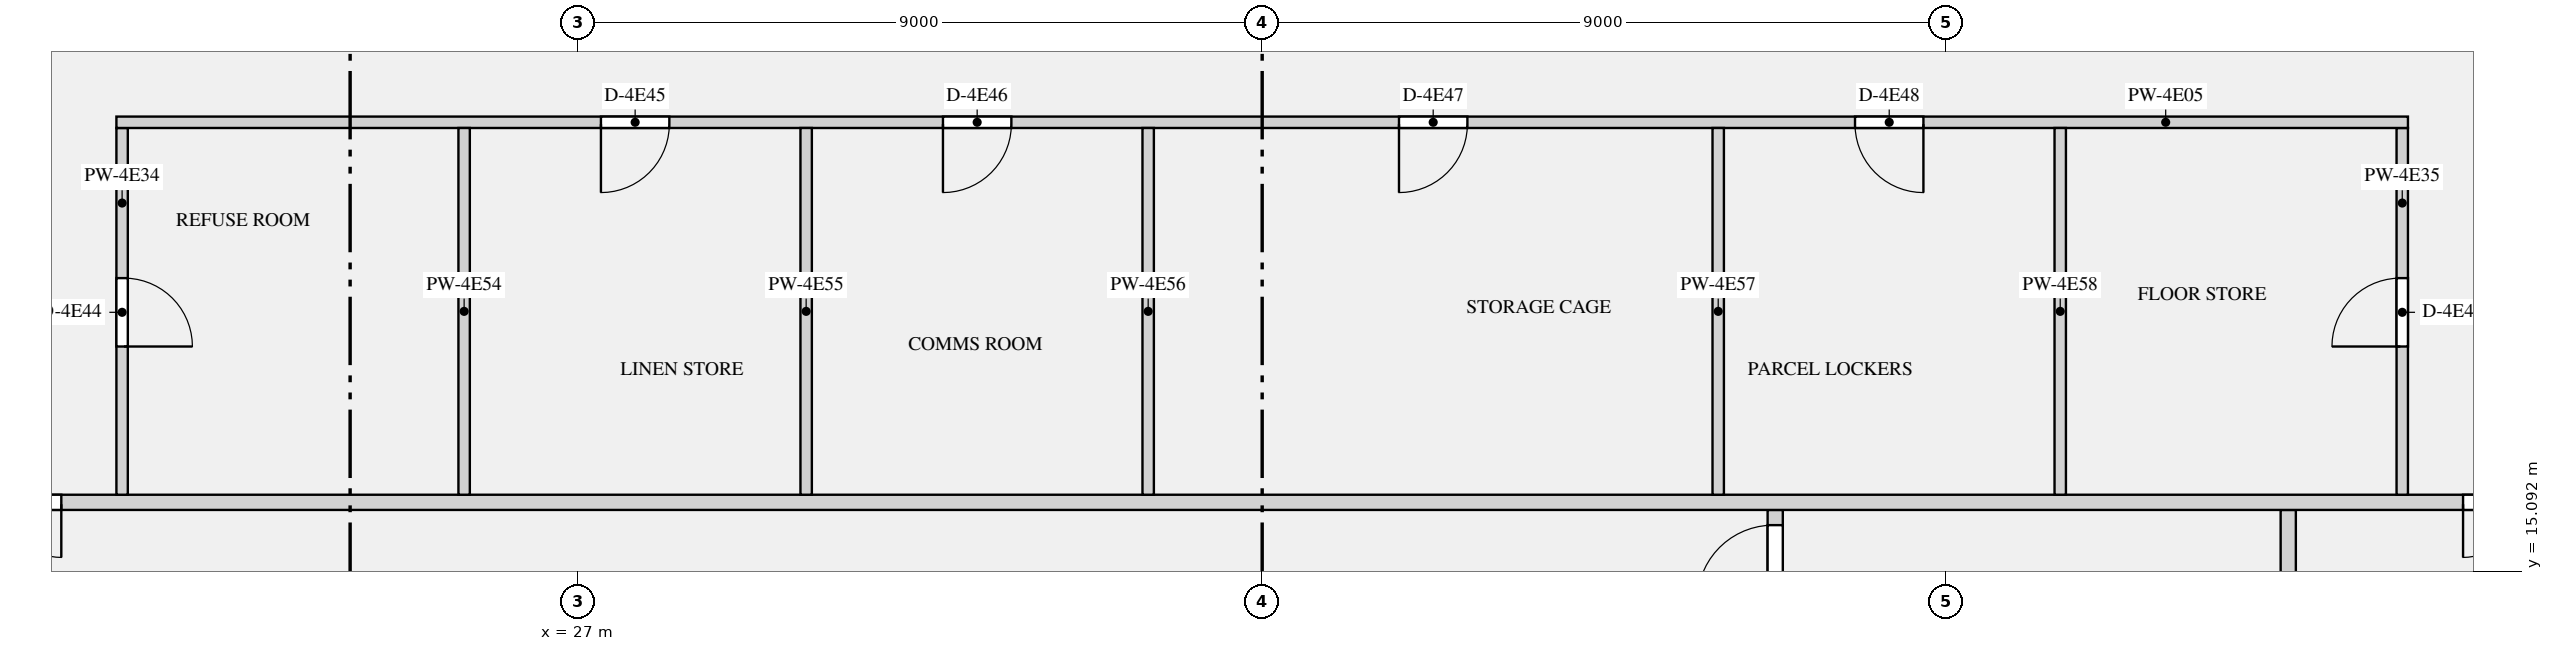
"""IFC4 building model, lengths in metres.
Left out: names, types, materials, properties, quantities, classifications, styles, units other than length and angle.
Written with IfcOpenShell. Run it as: python <this file> out.ifc"""

import sys

from ifc_helpers import new_model, si_unit, direction, frame, frame_2d, origin, place, context, subcontext, project, spatial, rectangle, extrude, element, fill, save


model = new_model("IFC4")
c1 = context("Model", 3, precision=1e-05, world=origin(), true_north=direction((0.0, 1.0)))
c2 = subcontext(c1, "Body", "Model", "MODEL_VIEW")
j1 = project(units=[si_unit("LENGTHUNIT", "METRE"), si_unit("PLANEANGLEUNIT", "RADIAN")], contexts=[c1])
p1 = place(None, origin())
s1 = spatial("IfcSite", under=j1, at=p1, CompositionType="ELEMENT")
p2 = place(p1, origin())
s2 = spatial("IfcBuilding", under=s1, at=p2, CompositionType="ELEMENT")
p3 = place(p2, frame((0.0, 0.0, 229.5)))
s3 = spatial("IfcBuildingStorey", under=s2, at=p3, CompositionType="ELEMENT", Elevation=229.5)
p4 = place(p3, frame((49.5, 12.5, 0.0), z_axis=(0.0, 0.0, 1.0), x_axis=(0.0, 1.0, 0.0)))
e1 = element("IfcWall", 1, at=p4, inside=s3, PredefinedType="PARTITIONING", context=c2, shape_type="SweptSolid", body=[
    extrude(rectangle(XDim=3.4, YDim=0.2, at=frame_2d((1.7, 0.0))), origin(), (0.0, 0.0, 1.0), 2.83),
])
p5 = place(p4, frame((1.15, 0.0, 0.0)))
e2 = element("IfcOpeningElement", 2, at=p5, cuts=e1, PredefinedType="OPENING", context=c2, shape_type="SweptSolid", body=[
    extrude(rectangle(XDim=1.1, YDim=2.1, at=frame_2d((0.55, 1.05))), frame((0.0, 0.11, 0.0), z_axis=(0.0, -1.0, 0.0), x_axis=(1.0, 0.0, 0.0)), (0.0, 0.0, 1.0), 0.22),
])
p6 = place(p3, frame((42.75, 14.575, 0.0), z_axis=(0.0, 0.0, 1.0), x_axis=(0.0, 1.0, 0.0)))
e3 = element("IfcWall", 3, at=p6, inside=s3, PredefinedType="PARTITIONING", context=c2, shape_type="SweptSolid", body=[
    extrude(rectangle(XDim=1.325, YDim=0.2, at=frame_2d((0.663, 0.0))), origin(), (0.0, 0.0, 1.0), 2.83),
])
p7 = place(p6, frame((0.125, 0.0, 0.0)))
e4 = element("IfcOpeningElement", 4, at=p7, cuts=e3, PredefinedType="OPENING", context=c2, shape_type="SweptSolid", body=[
    extrude(rectangle(XDim=1.0, YDim=2.1, at=frame_2d((0.5, 1.05))), frame((0.0, 0.11, 0.0), z_axis=(0.0, -1.0, 0.0), x_axis=(1.0, 0.0, 0.0)), (0.0, 0.0, 1.0), 0.22),
])
p8 = place(p3, frame((20.925, 21.0, 0.0), z_axis=(0.0, 0.0, 1.0), x_axis=(1.0, 0.0, 0.0)))
e5 = element("IfcWall", 5, at=p8, inside=s3, PredefinedType="PARTITIONING", context=c2, shape_type="SweptSolid", body=[
    extrude(rectangle(XDim=30.15, YDim=0.15, at=frame_2d((15.075, 0.0))), origin(), (0.0, 0.0, 1.0), 2.83),
])
p9 = place(p8, frame((6.375, 0.0, 0.0)))
e6 = element("IfcOpeningElement", 6, at=p9, cuts=e5, PredefinedType="OPENING", context=c2, shape_type="SweptSolid", body=[
    extrude(rectangle(XDim=0.9, YDim=2.1, at=frame_2d((0.45, 1.05))), frame((0.0, 0.085, 0.0), z_axis=(0.0, -1.0, 0.0), x_axis=(1.0, 0.0, 0.0)), (0.0, 0.0, 1.0), 0.17),
])
p10 = place(p8, frame((10.875, 0.0, 0.0)))
e7 = element("IfcOpeningElement", 7, at=p10, cuts=e5, PredefinedType="OPENING", context=c2, shape_type="SweptSolid", body=[
    extrude(rectangle(XDim=0.9, YDim=2.1, at=frame_2d((0.45, 1.05))), frame((0.0, 0.085, 0.0), z_axis=(0.0, -1.0, 0.0), x_axis=(1.0, 0.0, 0.0)), (0.0, 0.0, 1.0), 0.17),
])
p11 = place(p8, frame((16.875, 0.0, 0.0)))
e8 = element("IfcOpeningElement", 8, at=p11, cuts=e5, PredefinedType="OPENING", context=c2, shape_type="SweptSolid", body=[
    extrude(rectangle(XDim=0.9, YDim=2.1, at=frame_2d((0.45, 1.05))), frame((0.0, 0.085, 0.0), z_axis=(0.0, -1.0, 0.0), x_axis=(1.0, 0.0, 0.0)), (0.0, 0.0, 1.0), 0.17),
])
p12 = place(p8, frame((22.875, 0.0, 0.0)))
e9 = element("IfcOpeningElement", 9, at=p12, cuts=e5, PredefinedType="OPENING", context=c2, shape_type="SweptSolid", body=[
    extrude(rectangle(XDim=0.9, YDim=2.1, at=frame_2d((0.45, 1.05))), frame((0.0, 0.085, 0.0), z_axis=(0.0, -1.0, 0.0), x_axis=(1.0, 0.0, 0.0)), (0.0, 0.0, 1.0), 0.17),
])
p13 = place(p3, frame((17.9, 16.0, 0.0), z_axis=(0.0, 0.0, 1.0), x_axis=(1.0, 0.0, 0.0)))
e10 = element("IfcWall", 10, at=p13, inside=s3, PredefinedType="PARTITIONING", context=c2, shape_type="SweptSolid", body=[
    extrude(rectangle(XDim=36.2, YDim=0.2, at=frame_2d((18.1, 0.0))), origin(), (0.0, 0.0, 1.0), 2.83),
])
p14 = place(p13, frame((0.9, 0.0, 0.0)))
e11 = element("IfcOpeningElement", 11, at=p14, cuts=e10, PredefinedType="OPENING", context=c2, shape_type="SweptSolid", body=[
    extrude(rectangle(XDim=1.4, YDim=2.1, at=frame_2d((0.7, 1.05))), frame((0.0, 0.11, 0.0), z_axis=(0.0, -1.0, 0.0), x_axis=(1.0, 0.0, 0.0)), (0.0, 0.0, 1.0), 0.22),
])
p15 = place(p13, frame((33.9, 0.0, 0.0)))
e12 = element("IfcOpeningElement", 12, at=p15, cuts=e10, PredefinedType="OPENING", context=c2, shape_type="SweptSolid", body=[
    extrude(rectangle(XDim=1.4, YDim=2.1, at=frame_2d((0.7, 1.05))), frame((0.0, 0.11, 0.0), z_axis=(0.0, -1.0, 0.0), x_axis=(1.0, 0.0, 0.0)), (0.0, 0.0, 1.0), 0.22),
])
p16 = place(p3, frame((21.0, 16.1, 0.0), z_axis=(0.0, 0.0, 1.0), x_axis=(0.0, 1.0, 0.0)))
e13 = element("IfcWall", 13, at=p16, inside=s3, PredefinedType="PARTITIONING", context=c2, shape_type="SweptSolid", body=[
    extrude(rectangle(XDim=4.825, YDim=0.15, at=frame_2d((2.413, 0.0))), origin(), (0.0, 0.0, 1.0), 2.83),
])
p17 = place(p16, frame((1.95, 0.0, 0.0)))
e14 = element("IfcOpeningElement", 14, at=p17, cuts=e13, PredefinedType="OPENING", context=c2, shape_type="SweptSolid", body=[
    extrude(rectangle(XDim=0.9, YDim=2.1, at=frame_2d((0.45, 1.05))), frame((0.0, 0.085, 0.0), z_axis=(0.0, -1.0, 0.0), x_axis=(1.0, 0.0, 0.0)), (0.0, 0.0, 1.0), 0.17),
])
p18 = place(p3, frame((51.0, 16.1, 0.0), z_axis=(0.0, 0.0, 1.0), x_axis=(0.0, 1.0, 0.0)))
e15 = element("IfcWall", 15, at=p18, inside=s3, PredefinedType="PARTITIONING", context=c2, shape_type="SweptSolid", body=[
    extrude(rectangle(XDim=4.825, YDim=0.15, at=frame_2d((2.413, 0.0))), origin(), (0.0, 0.0, 1.0), 2.83),
])
p19 = place(p18, frame((1.95, 0.0, 0.0)))
e16 = element("IfcOpeningElement", 16, at=p19, cuts=e15, PredefinedType="OPENING", context=c2, shape_type="SweptSolid", body=[
    extrude(rectangle(XDim=0.9, YDim=2.1, at=frame_2d((0.45, 1.05))), frame((0.0, 0.085, 0.0), z_axis=(0.0, -1.0, 0.0), x_axis=(1.0, 0.0, 0.0)), (0.0, 0.0, 1.0), 0.17),
])
for number, where, z_axis, x_axis in (
    (17, (25.5, 16.1, 0.0), (0.0, 0.0, 1.0), (0.0, 1.0, 0.0)),
    (18, (30.0, 16.1, 0.0), (0.0, 0.0, 1.0), (0.0, 1.0, 0.0)),
    (19, (34.5, 16.1, 0.0), (0.0, 0.0, 1.0), (0.0, 1.0, 0.0)),
    (20, (42.0, 16.1, 0.0), (0.0, 0.0, 1.0), (0.0, 1.0, 0.0)),
    (21, (46.5, 16.1, 0.0), (0.0, 0.0, 1.0), (0.0, 1.0, 0.0)),
):
    element("IfcWall", number, at=place(p3, frame(where, z_axis=z_axis, x_axis=x_axis)), inside=s3, PredefinedType="PARTITIONING", context=c2, shape_type="SweptSolid", body=[
        extrude(rectangle(XDim=4.825, YDim=0.15, at=frame_2d((2.413, 0.0))), origin(), (0.0, 0.0, 1.0), 2.83),
    ])
p20 = place(p7, origin())
e22 = element("IfcDoor", 22, at=p20, inside=s3, OperationType="SINGLE_SWING_LEFT", PredefinedType="DOOR", context=c2, shape_type="SweptSolid", body=[
    extrude(rectangle(XDim=1.0, YDim=2.1, at=frame_2d((0.5, 1.05))), frame((0.0, 0.025, 0.0), z_axis=(0.0, -1.0, 0.0), x_axis=(1.0, 0.0, 0.0)), (0.0, 0.0, 1.0), 0.05),
])
fill(e4, e22)
p21 = place(p14, frame((1.4, 0.0, 0.0), z_axis=(0.0, 0.0, 1.0), x_axis=(-1.0, 0.0, 0.0)))
e23 = element("IfcDoor", 23, at=p21, inside=s3, OperationType="DOUBLE_DOOR_SINGLE_SWING", PredefinedType="DOOR", context=c2, shape_type="SweptSolid", body=[
    extrude(rectangle(XDim=1.4, YDim=2.1, at=frame_2d((0.7, 1.05))), frame((0.0, 0.025, 0.0), z_axis=(0.0, -1.0, 0.0), x_axis=(1.0, 0.0, 0.0)), (0.0, 0.0, 1.0), 0.05),
])
fill(e11, e23)
p22 = place(p15, frame((1.4, 0.0, 0.0), z_axis=(0.0, 0.0, 1.0), x_axis=(-1.0, 0.0, 0.0)))
e24 = element("IfcDoor", 24, at=p22, inside=s3, OperationType="DOUBLE_DOOR_SINGLE_SWING", PredefinedType="DOOR", context=c2, shape_type="SweptSolid", body=[
    extrude(rectangle(XDim=1.4, YDim=2.1, at=frame_2d((0.7, 1.05))), frame((0.0, 0.025, 0.0), z_axis=(0.0, -1.0, 0.0), x_axis=(1.0, 0.0, 0.0)), (0.0, 0.0, 1.0), 0.05),
])
fill(e12, e24)
p23 = place(p17, frame((0.9, 0.0, 0.0), z_axis=(0.0, 0.0, 1.0), x_axis=(-1.0, 0.0, 0.0)))
e25 = element("IfcDoor", 25, at=p23, inside=s3, OperationType="SINGLE_SWING_RIGHT", PredefinedType="DOOR", context=c2, shape_type="SweptSolid", body=[
    extrude(rectangle(XDim=0.9, YDim=2.1, at=frame_2d((0.45, 1.05))), frame((0.0, 0.025, 0.0), z_axis=(0.0, -1.0, 0.0), x_axis=(1.0, 0.0, 0.0)), (0.0, 0.0, 1.0), 0.05),
])
fill(e14, e25)
p24 = place(p9, frame((0.9, 0.0, 0.0), z_axis=(0.0, 0.0, 1.0), x_axis=(-1.0, 0.0, 0.0)))
e26 = element("IfcDoor", 26, at=p24, inside=s3, OperationType="SINGLE_SWING_RIGHT", PredefinedType="DOOR", context=c2, shape_type="SweptSolid", body=[
    extrude(rectangle(XDim=0.9, YDim=2.1, at=frame_2d((0.45, 1.05))), frame((0.0, 0.025, 0.0), z_axis=(0.0, -1.0, 0.0), x_axis=(1.0, 0.0, 0.0)), (0.0, 0.0, 1.0), 0.05),
])
fill(e6, e26)
p25 = place(p10, frame((0.9, 0.0, 0.0), z_axis=(0.0, 0.0, 1.0), x_axis=(-1.0, 0.0, 0.0)))
e27 = element("IfcDoor", 27, at=p25, inside=s3, OperationType="SINGLE_SWING_RIGHT", PredefinedType="DOOR", context=c2, shape_type="SweptSolid", body=[
    extrude(rectangle(XDim=0.9, YDim=2.1, at=frame_2d((0.45, 1.05))), frame((0.0, 0.025, 0.0), z_axis=(0.0, -1.0, 0.0), x_axis=(1.0, 0.0, 0.0)), (0.0, 0.0, 1.0), 0.05),
])
fill(e7, e27)
p26 = place(p11, frame((0.9, 0.0, 0.0), z_axis=(0.0, 0.0, 1.0), x_axis=(-1.0, 0.0, 0.0)))
e28 = element("IfcDoor", 28, at=p26, inside=s3, OperationType="SINGLE_SWING_RIGHT", PredefinedType="DOOR", context=c2, shape_type="SweptSolid", body=[
    extrude(rectangle(XDim=0.9, YDim=2.1, at=frame_2d((0.45, 1.05))), frame((0.0, 0.025, 0.0), z_axis=(0.0, -1.0, 0.0), x_axis=(1.0, 0.0, 0.0)), (0.0, 0.0, 1.0), 0.05),
])
fill(e8, e28)
p27 = place(p12, frame((0.9, 0.0, 0.0), z_axis=(0.0, 0.0, 1.0), x_axis=(-1.0, 0.0, 0.0)))
e29 = element("IfcDoor", 29, at=p27, inside=s3, OperationType="SINGLE_SWING_LEFT", PredefinedType="DOOR", context=c2, shape_type="SweptSolid", body=[
    extrude(rectangle(XDim=0.9, YDim=2.1, at=frame_2d((0.45, 1.05))), frame((0.0, 0.025, 0.0), z_axis=(0.0, -1.0, 0.0), x_axis=(1.0, 0.0, 0.0)), (0.0, 0.0, 1.0), 0.05),
])
fill(e9, e29)
p28 = place(p19, origin())
e30 = element("IfcDoor", 30, at=p28, inside=s3, OperationType="SINGLE_SWING_LEFT", PredefinedType="DOOR", context=c2, shape_type="SweptSolid", body=[
    extrude(rectangle(XDim=0.9, YDim=2.1, at=frame_2d((0.45, 1.05))), frame((0.0, 0.025, 0.0), z_axis=(0.0, -1.0, 0.0), x_axis=(1.0, 0.0, 0.0)), (0.0, 0.0, 1.0), 0.05),
])
fill(e16, e30)
save(model, sys.argv[1])
